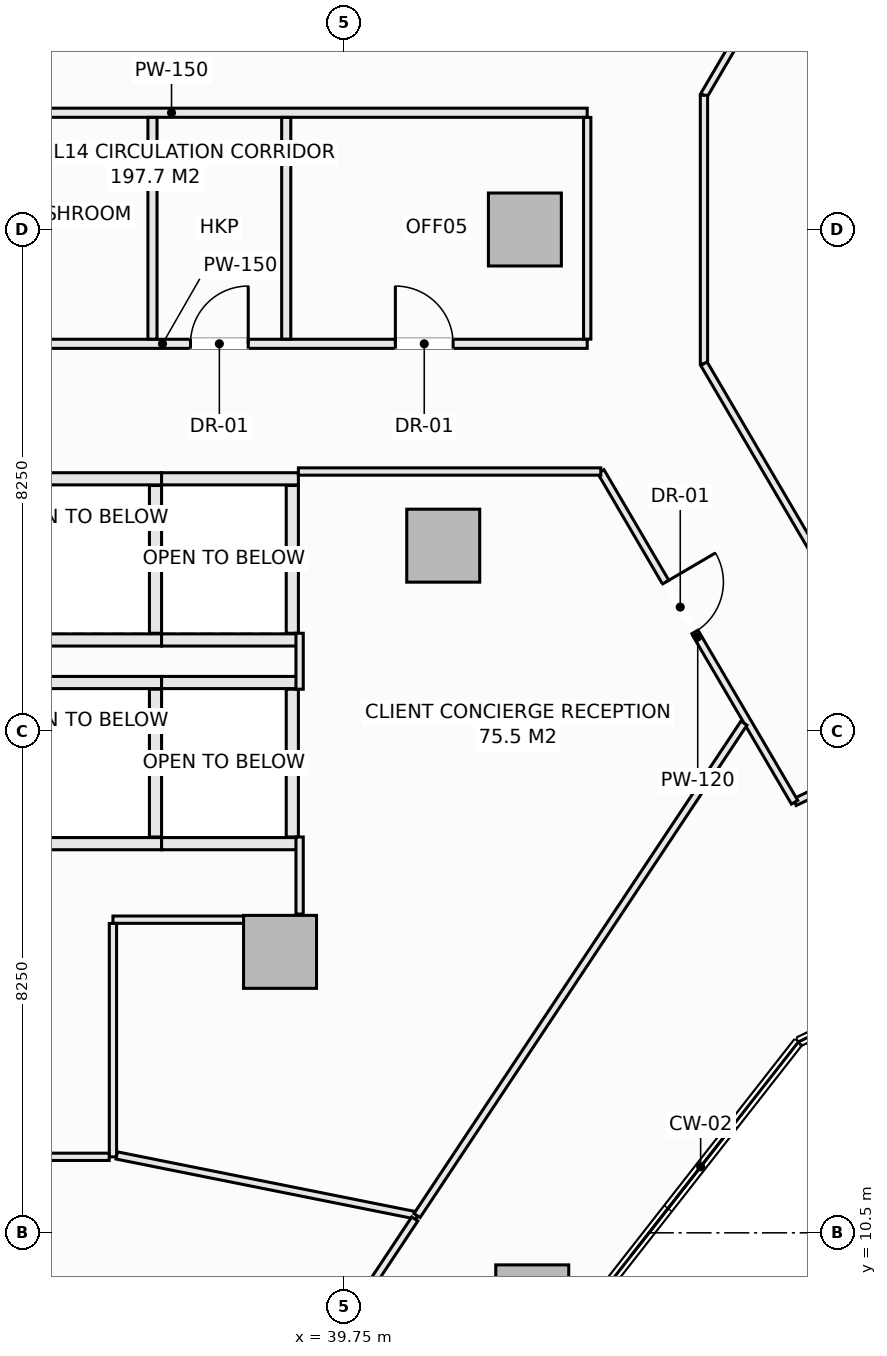
"""IFC4 building model, lengths in metres.
Left out: names, types, materials, properties, quantities, classifications, styles, units other than length and angle.
Written with IfcOpenShell. Run it as: python <this file> out.ifc"""

import sys

from ifc_helpers import new_model, si_unit, direction, frame, frame_2d, origin, origin_2d, place, context, subcontext, project, spatial, rectangle, extrude, element, fill, save


model = new_model("IFC4")
c1 = context("Model", 3, precision=1e-05, world=origin(), true_north=direction((0.0, 1.0)))
c2 = subcontext(c1, "Body", "Model", "MODEL_VIEW")
j1 = project(units=[si_unit("LENGTHUNIT", "METRE"), si_unit("PLANEANGLEUNIT", "RADIAN")], contexts=[c1])
p1 = place(None, origin())
s1 = spatial("IfcSite", under=j1, at=p1, CompositionType="ELEMENT")
p2 = place(p1, origin())
s2 = spatial("IfcBuilding", under=s1, at=p2, CompositionType="ELEMENT")
p3 = place(p2, frame((0.0, 0.0, 61.15)))
s3 = spatial("IfcBuildingStorey", under=s2, at=p3, CompositionType="ELEMENT", Elevation=61.15)
for number, where, z_axis, x_axis in (
    (1, (42.846, 9.373, -0.28), (0.0, 0.0, 1.0), (1.0, 0.0, 0.0)),
    (2, (42.725, 27.0, -0.28), (0.0, 0.0, 1.0), (1.0, 0.0, 0.0)),
    (3, (38.698, 15.121, -0.28), (0.0, 0.0, 1.0), (1.0, 0.0, 0.0)),
    (4, (41.382, 21.801, -0.28), (0.0, 0.0, 1.0), (1.0, 0.0, 0.0)),
):
    element("IfcColumn", number, at=place(p3, frame(where, z_axis=z_axis, x_axis=x_axis)), inside=s3, PredefinedType="COLUMN", context=c2, shape_type="SweptSolid", body=[
        extrude(rectangle(XDim=1.2, YDim=1.2, at=origin_2d()), origin(), (0.0, 0.0, 1.0), 3.85),
    ])
for number, where, z_axis, x_axis in (
    (5, (34.5, 19.55, 0.0), (0.0, 0.0, 1.0), (1.0, 0.0, 0.0)),
    (6, (34.5, 16.9, 0.0), (0.0, 0.0, 1.0), (1.0, 0.0, 0.0)),
):
    element("IfcWall", number, at=place(p3, frame(where, z_axis=z_axis, x_axis=x_axis)), inside=s3, PredefinedType="SOLIDWALL", context=c2, shape_type="SweptSolid", body=[
        extrude(rectangle(XDim=2.25, YDim=0.2, at=frame_2d((1.125, 0.0))), origin(), (0.0, 0.0, 1.0), 3.57),
    ])
p4 = place(p3, frame((36.65, 17.01, 0.0), z_axis=(0.0, 0.0, 1.0), x_axis=(0.0, 1.0, 0.0)))
e7 = element("IfcWall", 7, at=p4, inside=s3, PredefinedType="SOLIDWALL", context=c2, shape_type="SweptSolid", body=[
    extrude(rectangle(XDim=2.43, YDim=0.2, at=frame_2d((1.215, 0.0))), origin(), (0.0, 0.0, 1.0), 3.57),
])
for number, where, z_axis, x_axis in (
    (8, (36.75, 19.55, 0.0), (0.0, 0.0, 1.0), (1.0, 0.0, 0.0)),
    (9, (36.75, 16.9, 0.0), (0.0, 0.0, 1.0), (1.0, 0.0, 0.0)),
):
    element("IfcWall", number, at=place(p3, frame(where, z_axis=z_axis, x_axis=x_axis)), inside=s3, PredefinedType="SOLIDWALL", context=c2, shape_type="SweptSolid", body=[
        extrude(rectangle(XDim=2.25, YDim=0.2, at=frame_2d((1.125, 0.0))), origin(), (0.0, 0.0, 1.0), 3.57),
    ])
p5 = place(p3, frame((38.9, 17.01, 0.0), z_axis=(0.0, 0.0, 1.0), x_axis=(0.0, 1.0, 0.0)))
e10 = element("IfcWall", 10, at=p5, inside=s3, PredefinedType="SOLIDWALL", context=c2, shape_type="SweptSolid", body=[
    extrude(rectangle(XDim=2.43, YDim=0.2, at=frame_2d((1.215, 0.0))), origin(), (0.0, 0.0, 1.0), 3.57),
])
for number, where, z_axis, x_axis in (
    (11, (34.5, 22.9, 0.0), (0.0, 0.0, 1.0), (1.0, 0.0, 0.0)),
    (12, (34.5, 20.25, 0.0), (0.0, 0.0, 1.0), (1.0, 0.0, 0.0)),
):
    element("IfcWall", number, at=place(p3, frame(where, z_axis=z_axis, x_axis=x_axis)), inside=s3, PredefinedType="SOLIDWALL", context=c2, shape_type="SweptSolid", body=[
        extrude(rectangle(XDim=2.25, YDim=0.2, at=frame_2d((1.125, 0.0))), origin(), (0.0, 0.0, 1.0), 3.57),
    ])
p6 = place(p3, frame((36.65, 20.36, 0.0), z_axis=(0.0, 0.0, 1.0), x_axis=(0.0, 1.0, 0.0)))
e13 = element("IfcWall", 13, at=p6, inside=s3, PredefinedType="SOLIDWALL", context=c2, shape_type="SweptSolid", body=[
    extrude(rectangle(XDim=2.43, YDim=0.2, at=frame_2d((1.215, 0.0))), origin(), (0.0, 0.0, 1.0), 3.57),
])
for number, where, z_axis, x_axis in (
    (14, (36.75, 22.9, 0.0), (0.0, 0.0, 1.0), (1.0, 0.0, 0.0)),
    (15, (36.75, 20.25, 0.0), (0.0, 0.0, 1.0), (1.0, 0.0, 0.0)),
):
    element("IfcWall", number, at=place(p3, frame(where, z_axis=z_axis, x_axis=x_axis)), inside=s3, PredefinedType="SOLIDWALL", context=c2, shape_type="SweptSolid", body=[
        extrude(rectangle(XDim=2.25, YDim=0.2, at=frame_2d((1.125, 0.0))), origin(), (0.0, 0.0, 1.0), 3.57),
    ])
p7 = place(p3, frame((38.9, 20.36, 0.0), z_axis=(0.0, 0.0, 1.0), x_axis=(0.0, 1.0, 0.0)))
e16 = element("IfcWall", 16, at=p7, inside=s3, PredefinedType="SOLIDWALL", context=c2, shape_type="SweptSolid", body=[
    extrude(rectangle(XDim=2.43, YDim=0.2, at=frame_2d((1.215, 0.0))), origin(), (0.0, 0.0, 1.0), 3.57),
])
p8 = place(p3, frame((29.78, 25.12, 0.0), z_axis=(0.0, 0.0, 1.0), x_axis=(1.0, 0.0, 0.0)))
e17 = element("IfcWall", 17, at=p8, inside=s3, PredefinedType="PARTITIONING", context=c2, shape_type="SweptSolid", body=[
    extrude(rectangle(XDim=13.97, YDim=0.15, at=frame_2d((6.985, 0.0))), origin(), (0.0, 0.0, 1.0), 3.57),
])
p9 = place(p8, frame((3.14, 0.0, 0.0)))
e18 = element("IfcOpeningElement", 18, at=p9, cuts=e17, PredefinedType="OPENING", context=c2, shape_type="SweptSolid", body=[
    extrude(rectangle(XDim=0.95, YDim=2.1, at=frame_2d((0.475, 1.05))), frame((0.0, 0.085, 0.0), z_axis=(0.0, -1.0, 0.0), x_axis=(1.0, 0.0, 0.0)), (0.0, 0.0, 1.0), 0.17),
])
p10 = place(p8, frame((7.445, 0.0, 0.0)))
e19 = element("IfcOpeningElement", 19, at=p10, cuts=e17, PredefinedType="OPENING", context=c2, shape_type="SweptSolid", body=[
    extrude(rectangle(XDim=0.95, YDim=2.1, at=frame_2d((0.475, 1.05))), frame((0.0, 0.085, 0.0), z_axis=(0.0, -1.0, 0.0), x_axis=(1.0, 0.0, 0.0)), (0.0, 0.0, 1.0), 0.17),
])
p11 = place(p8, frame((10.815, 0.0, 0.0)))
e20 = element("IfcOpeningElement", 20, at=p11, cuts=e17, PredefinedType="OPENING", context=c2, shape_type="SweptSolid", body=[
    extrude(rectangle(XDim=0.95, YDim=2.1, at=frame_2d((0.475, 1.05))), frame((0.0, 0.085, 0.0), z_axis=(0.0, -1.0, 0.0), x_axis=(1.0, 0.0, 0.0)), (0.0, 0.0, 1.0), 0.17),
])
p12 = place(p3, frame((30.077, 28.92, 0.0), z_axis=(0.0, 0.0, 1.0), x_axis=(1.0, 0.0, 0.0)))
e21 = element("IfcWall", 21, at=p12, inside=s3, PredefinedType="PARTITIONING", context=c2, shape_type="SweptSolid", body=[
    extrude(rectangle(XDim=13.673, YDim=0.15, at=frame_2d((6.836, 0.0))), origin(), (0.0, 0.0, 1.0), 3.57),
])
for number, where, z_axis, x_axis in (
    (22, (36.6, 25.197, 0.0), (0.0, 0.0, 1.0), (0.0, 1.0, 0.0)),
    (23, (38.8, 25.197, 0.0), (0.0, 0.0, 1.0), (0.0, 1.0, 0.0)),
):
    element("IfcWall", number, at=place(p3, frame(where, z_axis=z_axis, x_axis=x_axis)), inside=s3, PredefinedType="PARTITIONING", context=c2, shape_type="SweptSolid", body=[
        extrude(rectangle(XDim=3.646, YDim=0.15, at=frame_2d((1.823, 0.0))), origin(), (0.0, 0.0, 1.0), 3.57),
    ])
p13 = place(p3, frame((35.95, 15.65, 0.0), z_axis=(0.0, 0.0, 1.0), x_axis=(1.0, 0.0, 0.0)))
e24 = element("IfcWall", 24, at=p13, inside=s3, PredefinedType="PARTITIONING", context=c2, shape_type="SweptSolid", body=[
    extrude(rectangle(XDim=2.291, YDim=0.12, at=frame_2d((1.146, 0.0))), origin(), (0.0, 0.0, 1.0), 3.57),
])
p14 = place(p3, frame((35.95, 11.75, 0.0), z_axis=(0.0, 0.0, 1.0), x_axis=(0.0, 1.0, 0.0)))
e25 = element("IfcWall", 25, at=p14, inside=s3, PredefinedType="PARTITIONING", context=c2, shape_type="SweptSolid", body=[
    extrude(rectangle(XDim=3.838, YDim=0.12, at=frame_2d((1.919, 0.0))), origin(), (0.0, 0.0, 1.0), 3.57),
])
p15 = place(p3, frame((27.227, 11.75, 0.0), z_axis=(0.0, 0.0, 1.0), x_axis=(1.0, 0.0, 0.0)))
e26 = element("IfcWall", 26, at=p15, inside=s3, PredefinedType="PARTITIONING", context=c2, shape_type="SweptSolid", body=[
    extrude(rectangle(XDim=8.661, YDim=0.12, at=frame_2d((4.331, 0.0))), origin(), (0.0, 0.0, 1.0), 3.57),
])
p16 = place(p15, frame((5.206, 0.0, 0.0)))
e27 = element("IfcOpeningElement", 27, at=p16, cuts=e26, PredefinedType="OPENING", context=c2, shape_type="SweptSolid", body=[
    extrude(rectangle(XDim=0.95, YDim=2.1, at=frame_2d((0.475, 1.05))), frame((0.0, 0.07, 0.0), z_axis=(0.0, -1.0, 0.0), x_axis=(1.0, 0.0, 0.0)), (0.0, 0.0, 1.0), 0.14),
])
p17 = place(p3, frame((45.67, 29.207, 0.0), z_axis=(0.0, 0.0, 1.0), x_axis=(0.505582857323, 0.86277805627, 0.0)))
e28 = element("IfcWall", 28, at=p17, inside=s3, PredefinedType="PARTITIONING", context=c2, shape_type="SweptSolid", body=[
    extrude(rectangle(XDim=7.108, YDim=0.12, at=frame_2d((3.554, 0.0))), origin(), (0.0, 0.0, 1.0), 3.57),
])
p18 = place(p17, frame((2.695, 0.0, 0.0)))
e29 = element("IfcOpeningElement", 29, at=p18, cuts=e28, PredefinedType="OPENING", context=c2, shape_type="SweptSolid", body=[
    extrude(rectangle(XDim=0.95, YDim=2.1, at=frame_2d((0.475, 1.05))), frame((0.0, 0.07, 0.0), z_axis=(0.0, -1.0, 0.0), x_axis=(1.0, 0.0, 0.0)), (0.0, 0.0, 1.0), 0.14),
])
p19 = place(p3, frame((45.67, 24.793, 0.0), z_axis=(0.0, 0.0, 1.0), x_axis=(0.0, 1.0, 0.0)))
e30 = element("IfcWall", 30, at=p19, inside=s3, PredefinedType="PARTITIONING", context=c2, shape_type="SweptSolid", body=[
    extrude(rectangle(XDim=4.414, YDim=0.12, at=frame_2d((2.207, 0.0))), origin(), (0.0, 0.0, 1.0), 3.57),
])
p20 = place(p3, frame((45.67, 24.793, 0.0), z_axis=(0.0, 0.0, 1.0), x_axis=(0.505584917928, -0.862776848764, 0.0)))
e31 = element("IfcWall", 31, at=p20, inside=s3, PredefinedType="PARTITIONING", context=c2, shape_type="SweptSolid", body=[
    extrude(rectangle(XDim=7.17, YDim=0.12, at=frame_2d((3.585, 0.0))), origin(), (0.0, 0.0, 1.0), 3.57),
])
p21 = place(p20, frame((5.016, 0.0, 0.0)))
e32 = element("IfcOpeningElement", 32, at=p21, cuts=e31, PredefinedType="OPENING", context=c2, shape_type="SweptSolid", body=[
    extrude(rectangle(XDim=0.95, YDim=2.1, at=frame_2d((0.475, 1.05))), frame((0.0, 0.07, 0.0), z_axis=(0.0, -1.0, 0.0), x_axis=(1.0, 0.0, 0.0)), (0.0, 0.0, 1.0), 0.14),
])
p22 = place(p3, frame((47.161, 17.581, 0.0), z_axis=(0.0, 0.0, 1.0), x_axis=(0.901265146481, 0.433267972204, 0.0)))
e33 = element("IfcWall", 33, at=p22, inside=s3, PredefinedType="PARTITIONING", context=c2, shape_type="SweptSolid", body=[
    extrude(rectangle(XDim=2.306, YDim=0.12, at=frame_2d((1.153, 0.0))), origin(), (0.0, 0.0, 1.0), 3.57),
])
p23 = place(p3, frame((43.974, 23.02, 0.0), z_axis=(0.0, 0.0, 1.0), x_axis=(0.505531634194, -0.862808070679, 0.0)))
e34 = element("IfcWall", 34, at=p23, inside=s3, PredefinedType="PARTITIONING", context=c2, shape_type="SweptSolid", body=[
    extrude(rectangle(XDim=6.304, YDim=0.12, at=frame_2d((3.152, 0.0))), origin(), (0.0, 0.0, 1.0), 3.205),
])
p24 = place(p23, frame((2.109, 0.0, 0.0)))
e35 = element("IfcOpeningElement", 35, at=p24, cuts=e34, PredefinedType="OPENING", context=c2, shape_type="SweptSolid", body=[
    extrude(rectangle(XDim=0.95, YDim=2.1, at=frame_2d((0.475, 1.05))), frame((0.0, 0.07, 0.0), z_axis=(0.0, -1.0, 0.0), x_axis=(1.0, 0.0, 0.0)), (0.0, 0.0, 1.0), 0.14),
])
p25 = place(p3, frame((39.0, 23.02, 0.0), z_axis=(0.0, 0.0, 1.0), x_axis=(1.0, 0.0, 0.0)))
e36 = element("IfcWall", 36, at=p25, inside=s3, PredefinedType="PARTITIONING", context=c2, shape_type="SweptSolid", body=[
    extrude(rectangle(XDim=4.974, YDim=0.12, at=frame_2d((2.487, 0.0))), origin(), (0.0, 0.0, 1.0), 3.57),
])
p26 = place(p3, frame((39.02, 15.742, 0.0), z_axis=(0.0, 0.0, 1.0), x_axis=(0.0, 1.0, 0.0)))
e37 = element("IfcWall", 37, at=p26, inside=s3, PredefinedType="PARTITIONING", context=c2, shape_type="SweptSolid", body=[
    extrude(rectangle(XDim=1.268, YDim=0.12, at=frame_2d((0.634, 0.0))), origin(), (0.0, 0.0, 1.0), 2.934),
])
p27 = place(p3, frame((39.02, 19.44, 0.0), z_axis=(0.0, 0.0, 1.0), x_axis=(0.0, 1.0, 0.0)))
e38 = element("IfcWall", 38, at=p27, inside=s3, PredefinedType="PARTITIONING", context=c2, shape_type="SweptSolid", body=[
    extrude(rectangle(XDim=0.92, YDim=0.12, at=frame_2d((0.46, 0.0))), origin(), (0.0, 0.0, 1.0), 3.57),
])
p28 = place(p3, frame((43.75, 25.197, 0.0), z_axis=(0.0, 0.0, 1.0), x_axis=(0.0, 1.0, 0.0)))
e39 = element("IfcWall", 39, at=p28, inside=s3, PredefinedType="PARTITIONING", context=c2, shape_type="SweptSolid", body=[
    extrude(rectangle(XDim=3.646, YDim=0.12, at=frame_2d((1.823, 0.0))), origin(), (0.0, 0.0, 1.0), 3.57),
])
p29 = place(p3, frame((36.012, 11.773, 0.0), z_axis=(0.0, 0.0, 1.0), x_axis=(0.980526579604, -0.196386421855, 0.0)))
e40 = element("IfcWall", 40, at=p29, inside=s3, PredefinedType="PARTITIONING", context=c2, shape_type="SweptSolid", body=[
    extrude(rectangle(XDim=5.037, YDim=0.12, at=frame_2d((2.519, 0.0))), origin(), (0.0, 0.0, 1.0), 3.57),
])
p30 = place(p3, frame((38.625, 7.28, 0.0), z_axis=(0.0, 0.0, 1.0), x_axis=(0.553106233715, 0.833110733471, 0.0)))
e41 = element("IfcWall", 41, at=p30, inside=s3, PredefinedType="PARTITIONING", context=c2, shape_type="SweptSolid", body=[
    extrude(rectangle(XDim=4.138, YDim=0.12, at=frame_2d((2.069, 0.0))), origin(), (0.0, 0.0, 1.0), 3.57),
])
p31 = place(p3, frame((40.951, 10.783, 0.0), z_axis=(0.0, 0.0, 1.0), x_axis=(0.553122636923, 0.83309984307, 0.0)))
e42 = element("IfcWall", 42, at=p31, inside=s3, PredefinedType="PARTITIONING", context=c2, shape_type="SweptSolid", body=[
    extrude(rectangle(XDim=9.72, YDim=0.12, at=frame_2d((4.86, 0.0))), origin(), (0.0, 0.0, 1.0), 3.57),
])
p32 = place(p10, origin())
e43 = element("IfcDoor", 43, at=p32, inside=s3, OperationType="SINGLE_SWING_RIGHT", PredefinedType="DOOR", context=c2, shape_type="SweptSolid", body=[
    extrude(rectangle(XDim=0.95, YDim=2.1, at=frame_2d((0.475, 1.05))), frame((0.0, 0.025, 0.0), z_axis=(0.0, -1.0, 0.0), x_axis=(1.0, 0.0, 0.0)), (0.0, 0.0, 1.0), 0.05),
])
fill(e19, e43)
p33 = place(p24, origin())
e44 = element("IfcDoor", 44, at=p33, inside=s3, OperationType="SINGLE_SWING_LEFT", PredefinedType="DOOR", context=c2, shape_type="SweptSolid", body=[
    extrude(rectangle(XDim=0.95, YDim=2.1, at=frame_2d((0.475, 1.05))), frame((0.0, 0.025, 0.0), z_axis=(0.0, -1.0, 0.0), x_axis=(1.0, 0.0, 0.0)), (0.0, 0.0, 1.0), 0.05),
])
fill(e35, e44)
p34 = place(p11, origin())
e45 = element("IfcDoor", 45, at=p34, inside=s3, OperationType="SINGLE_SWING_LEFT", PredefinedType="DOOR", context=c2, shape_type="SweptSolid", body=[
    extrude(rectangle(XDim=0.95, YDim=2.1, at=frame_2d((0.475, 1.05))), frame((0.0, 0.025, 0.0), z_axis=(0.0, -1.0, 0.0), x_axis=(1.0, 0.0, 0.0)), (0.0, 0.0, 1.0), 0.05),
])
fill(e20, e45)
save(model, sys.argv[1])
